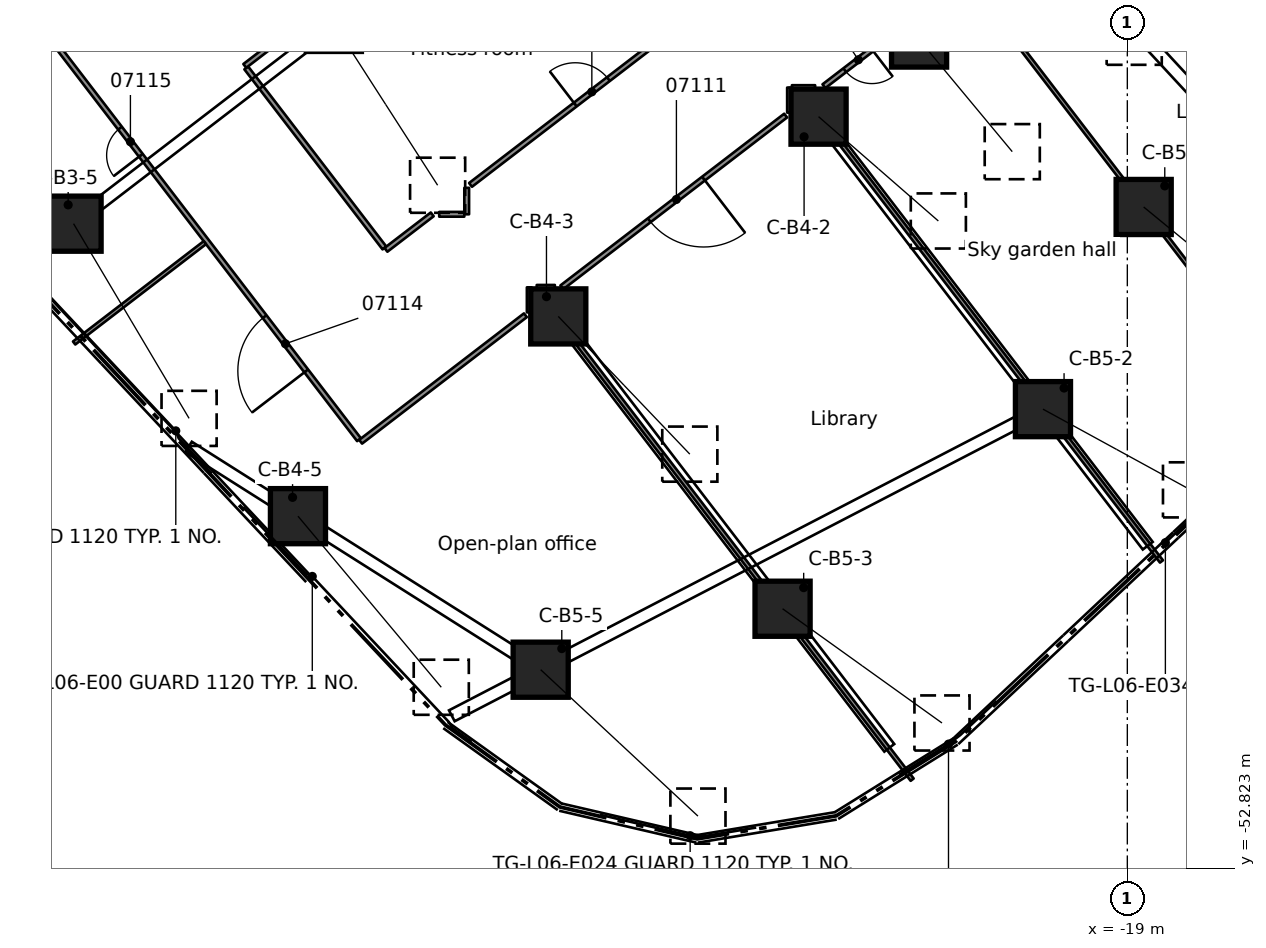
"""IFC4 building model, lengths in metres.
Left out: names, types, materials, properties, quantities, classifications, styles, units other than length and angle.
Written with IfcOpenShell. Run it as: python <this file> out.ifc"""

import sys

from ifc_helpers import new_model, si_unit, direction, frame, frame_2d, origin, origin_2d, place, context, subcontext, project, spatial, rectangle, extrude, element, fill, save


model = new_model("IFC4")
c1 = context("Model", 3, precision=1e-05, world=origin(), true_north=direction((0.0, 1.0)))
c2 = subcontext(c1, "Body", "Model", "MODEL_VIEW")
j1 = project(units=[si_unit("LENGTHUNIT", "METRE"), si_unit("PLANEANGLEUNIT", "RADIAN")], contexts=[c1])
p1 = place(None, origin())
s1 = spatial("IfcSite", under=j1, at=p1, CompositionType="ELEMENT")
p2 = place(p1, origin())
s2 = spatial("IfcBuilding", under=s1, at=p2, CompositionType="ELEMENT")
p3 = place(p2, frame((0.0, 0.0, 33.3)))
s3 = spatial("IfcBuildingStorey", under=s2, at=p3, CompositionType="ELEMENT", Elevation=33.3)
p4 = place(p3, frame((-39.879, -30.6, 0.638), z_axis=(0.476003991751, -0.740143212715, 0.474982341259), x_axis=(0.841076298964, 0.540916499397, 0.0)))
e1 = element("IfcColumn", 1, at=p4, inside=s3, PredefinedType="COLUMN", context=c2, shape_type="SweptSolid", body=[
    extrude(rectangle(XDim=1.45, YDim=1.45, at=origin_2d()), origin(), (0.0, 0.0, 1.0), 5.735),
])
p5 = place(p3, frame((-46.729, -35.856, 0.661), z_axis=(0.465465031922, -0.78439754496, 0.409954626171), x_axis=(0.859985150882, 0.510319057319, 0.0)))
e2 = element("IfcColumn", 2, at=p5, inside=s3, PredefinedType="COLUMN", context=c2, shape_type="SweptSolid", body=[
    extrude(rectangle(XDim=1.45, YDim=1.45, at=origin_2d()), origin(), (0.0, 0.0, 1.0), 6.531),
])
p6 = place(p3, frame((-27.125, -33.04, 0.603), z_axis=(0.626915434331, -0.545922874152, 0.555828439066), x_axis=(0.656712169931, 0.754141316906, 0.0)))
e3 = element("IfcColumn", 3, at=p6, inside=s3, PredefinedType="COLUMN", context=c2, shape_type="SweptSolid", body=[
    extrude(rectangle(XDim=1.45, YDim=1.45, at=origin_2d()), origin(), (0.0, 0.0, 1.0), 5.028),
])
p7 = place(p3, frame((-33.974, -38.296, 0.637), z_axis=(0.606713355896, -0.635258027433, 0.477855775689), x_axis=(0.723167492828, 0.690672699125, 0.0)))
e4 = element("IfcColumn", 4, at=p7, inside=s3, PredefinedType="COLUMN", context=c2, shape_type="SweptSolid", body=[
    extrude(rectangle(XDim=1.45, YDim=1.45, at=origin_2d()), origin(), (0.0, 0.0, 1.0), 5.705),
])
p8 = place(p3, frame((-40.824, -43.552, 0.659), z_axis=(0.584139953455, -0.697367651282, 0.415281679975), x_axis=(0.766596805008, 0.642128755431, 0.0)))
e5 = element("IfcColumn", 5, at=p8, inside=s3, PredefinedType="COLUMN", context=c2, shape_type="SweptSolid", body=[
    extrude(rectangle(XDim=1.45, YDim=1.45, at=origin_2d()), origin(), (0.0, 0.0, 1.0), 6.456),
])
p9 = place(p3, frame((-24.48, -31.011, 0.583), z_axis=(0.514125147633, -0.618557618127, 0.594190041678), x_axis=(0.769039707257, 0.639201008026, 0.0)))
e6 = element("IfcColumn", 6, at=p9, inside=s3, PredefinedType="COLUMN", context=c2, shape_type="SweptSolid", body=[
    extrude(rectangle(XDim=1.45, YDim=1.45, at=origin_2d()), origin(), (0.0, 0.0, 1.0), 4.769),
])
p10 = place(p3, frame((-20.99, -28.333, 0.552), z_axis=(0.48599783766, -0.586072291187, 0.648325050644), x_axis=(0.769766563569, 0.638325495035, 0.0)))
e7 = element("IfcColumn", 7, at=p10, inside=s3, PredefinedType="COLUMN", context=c2, shape_type="SweptSolid", body=[
    extrude(rectangle(XDim=1.45, YDim=1.45, at=origin_2d()), origin(), (0.0, 0.0, 1.0), 4.467),
])
p11 = place(p3, frame((-21.22, -40.736, 0.615), z_axis=(0.743612862638, -0.406754599494, 0.530651115432), x_axis=(0.479895272144, 0.877325782007, 0.0)))
e8 = element("IfcColumn", 8, at=p11, inside=s3, PredefinedType="COLUMN", context=c2, shape_type="SweptSolid", body=[
    extrude(rectangle(XDim=1.45, YDim=1.45, at=origin_2d()), origin(), (0.0, 0.0, 1.0), 5.222),
])
p12 = place(p3, frame((-28.072, -45.988, 0.641), z_axis=(0.719277998117, -0.515378613328, 0.465858397314), x_axis=(0.582441324018, 0.812872747775, 0.0)))
e9 = element("IfcColumn", 9, at=p12, inside=s3, PredefinedType="COLUMN", context=c2, shape_type="SweptSolid", body=[
    extrude(rectangle(XDim=1.45, YDim=1.45, at=origin_2d()), origin(), (0.0, 0.0, 1.0), 5.832),
])
p13 = place(p3, frame((-34.437, -47.592, 0.655), z_axis=(0.660892308039, -0.615231508422, 0.42978081416), x_axis=(0.681369867864, 0.731939275601, 0.0)))
e10 = element("IfcColumn", 10, at=p13, inside=s3, PredefinedType="COLUMN", context=c2, shape_type="SweptSolid", body=[
    extrude(rectangle(XDim=1.45, YDim=1.45, at=origin_2d()), origin(), (0.0, 0.0, 1.0), 6.261),
])
p14 = place(p3, frame((-18.57, -35.417, 0.574), z_axis=(0.612119529002, -0.502213041434, 0.610812363356), x_axis=(0.634287264239, 0.7730974495, 0.0)))
e11 = element("IfcColumn", 11, at=p14, inside=s3, PredefinedType="COLUMN", context=c2, shape_type="SweptSolid", body=[
    extrude(rectangle(XDim=1.45, YDim=1.45, at=origin_2d()), origin(), (0.0, 0.0, 1.0), 4.669),
])
p15 = place(p3, frame((-39.218, -41.54, 0.0), z_axis=(0.0, 0.0, 1.0), x_axis=(-0.608705901591, 0.79339594489, 0.0)))
e12 = element("IfcWall", 12, at=p15, inside=s3, PredefinedType="PARTITIONING", context=c2, shape_type="SweptSolid", body=[
    extrude(rectangle(XDim=13.169, YDim=0.125, at=frame_2d((6.584, 0.0))), origin(), (0.0, 0.0, 1.0), 3.56),
])
p16 = place(p15, frame((2.281, 0.0, 0.0)))
e13 = element("IfcOpeningElement", 13, at=p16, cuts=e12, PredefinedType="OPENING", context=c2, shape_type="SweptSolid", body=[
    extrude(rectangle(XDim=1.8, YDim=2.1, at=frame_2d((0.9, 1.05))), frame((0.0, 0.073, 0.0), z_axis=(0.0, -1.0, 0.0), x_axis=(1.0, 0.0, 0.0)), (0.0, 0.0, 1.0), 0.145),
])
p17 = place(p15, frame((9.431, 0.0, 0.0)))
e14 = element("IfcOpeningElement", 14, at=p17, cuts=e12, PredefinedType="OPENING", context=c2, shape_type="SweptSolid", body=[
    extrude(rectangle(XDim=0.9, YDim=2.1, at=frame_2d((0.45, 1.05))), frame((0.0, 0.073, 0.0), z_axis=(0.0, -1.0, 0.0), x_axis=(1.0, 0.0, 0.0)), (0.0, 0.0, 1.0), 0.145),
])
p18 = place(p3, frame((-42.185, -31.757, 0.0), z_axis=(0.0, 0.0, 1.0), x_axis=(0.608799639809, -0.793324018651, 0.0)))
e15 = element("IfcWall", 15, at=p18, inside=s3, PredefinedType="PARTITIONING", context=c2, shape_type="SweptSolid", body=[
    extrude(rectangle(XDim=5.972, YDim=0.125, at=frame_2d((2.986, 0.0))), origin(), (0.0, 0.0, 1.0), 3.56),
])
p19 = place(p3, frame((-34.501, -37.664, 0.0), z_axis=(0.0, 0.0, 1.0), x_axis=(0.608768597096, -0.793347839973, 0.0)))
e16 = element("IfcWall", 16, at=p19, inside=s3, PredefinedType="PARTITIONING", context=c2, shape_type="SweptSolid", body=[
    extrude(rectangle(XDim=16.162, YDim=0.1, at=frame_2d((8.081, 0.0))), origin(), (0.0, 0.0, 1.0), 3.56),
])
p20 = place(p3, frame((-27.599, -32.368, 0.0), z_axis=(0.0, 0.0, 1.0), x_axis=(0.608787633684, -0.793333232049, 0.0)))
e17 = element("IfcWall", 17, at=p20, inside=s3, PredefinedType="PARTITIONING", context=c2, shape_type="SweptSolid", body=[
    extrude(rectangle(XDim=15.6, YDim=0.1, at=frame_2d((7.8, 0.0))), origin(), (0.0, 0.0, 1.0), 3.56),
])
p21 = place(p3, frame((-23.19, -29.408, 0.0), z_axis=(0.0, 0.0, 1.0), x_axis=(0.608771263508, -0.793345793917, 0.0)))
e18 = element("IfcWall", 18, at=p21, inside=s3, PredefinedType="PARTITIONING", context=c2, shape_type="SweptSolid", body=[
    extrude(rectangle(XDim=14.738, YDim=0.1, at=frame_2d((7.369, 0.0))), origin(), (0.0, 0.0, 1.0), 3.56),
])
p22 = place(p3, frame((-18.742, -25.995, 0.0), z_axis=(0.0, 0.0, 1.0), x_axis=(0.608756044644, -0.79335747183, 0.0)))
e19 = element("IfcWall", 19, at=p22, inside=s3, PredefinedType="PARTITIONING", context=c2, shape_type="SweptSolid", body=[
    extrude(rectangle(XDim=14.181, YDim=0.1, at=frame_2d((7.091, 0.0))), origin(), (0.0, 0.0, 1.0), 3.56),
])
p23 = place(p3, frame((-34.541, -37.531, 0.0), z_axis=(0.0, 0.0, 1.0), x_axis=(1.0, 0.0, 0.0)))
e20 = element("IfcWall", 20, at=p23, inside=s3, PredefinedType="PARTITIONING", context=c2, shape_type="SweptSolid", body=[
    extrude(rectangle(XDim=0.477, YDim=0.125, at=frame_2d((0.239, 0.0))), origin(), (0.0, 0.0, 1.0), 3.56),
])
p24 = place(p3, frame((-37.107, -35.609, 0.0), z_axis=(0.0, 0.0, 1.0), x_axis=(1.0, 0.0, 0.0)))
e21 = element("IfcWall", 21, at=p24, inside=s3, PredefinedType="PARTITIONING", context=c2, shape_type="SweptSolid", body=[
    extrude(rectangle(XDim=0.66, YDim=0.125, at=frame_2d((0.33, 0.0))), origin(), (0.0, 0.0, 1.0), 3.56),
])
p25 = place(p3, frame((-27.826, -32.275, 0.0), z_axis=(0.0, 0.0, 1.0), x_axis=(1.0, 0.0, 0.0)))
e22 = element("IfcWall", 22, at=p25, inside=s3, PredefinedType="PARTITIONING", context=c2, shape_type="SweptSolid", body=[
    extrude(rectangle(XDim=0.611, YDim=0.125, at=frame_2d((0.305, 0.0))), origin(), (0.0, 0.0, 1.0), 3.56),
])
p26 = place(p3, frame((-39.175, -41.594, 0.0), z_axis=(0.0, 0.0, 1.0), x_axis=(0.793282735045, 0.608853432511, 0.0)))
e23 = element("IfcWall", 23, at=p26, inside=s3, PredefinedType="PARTITIONING", context=c2, shape_type="SweptSolid", body=[
    extrude(rectangle(XDim=5.466, YDim=0.125, at=frame_2d((2.733, 0.0))), origin(), (0.0, 0.0, 1.0), 3.56),
])
p27 = place(p3, frame((-27.991, -33.012, 0.0), z_axis=(0.0, 0.0, 1.0), x_axis=(-0.793332599064, -0.608788458549, 0.0)))
e24 = element("IfcWall", 24, at=p27, inside=s3, PredefinedType="PARTITIONING", context=c2, shape_type="SweptSolid", body=[
    extrude(rectangle(XDim=7.423, YDim=0.125, at=frame_2d((3.711, 0.0))), origin(), (0.0, 0.0, 1.0), 3.56),
])
p28 = place(p27, frame((2.723, 0.0, 0.0)))
e25 = element("IfcOpeningElement", 25, at=p28, cuts=e24, PredefinedType="OPENING", context=c2, shape_type="SweptSolid", body=[
    extrude(rectangle(XDim=1.8, YDim=2.1, at=frame_2d((0.9, 1.05))), frame((0.0, 0.073, 0.0), z_axis=(0.0, -1.0, 0.0), x_axis=(1.0, 0.0, 0.0)), (0.0, 0.0, 1.0), 0.145),
])
p29 = place(p3, frame((-25.346, -30.982, 0.0), z_axis=(0.0, 0.0, 1.0), x_axis=(-0.79329604463, -0.608836090893, 0.0)))
e26 = element("IfcWall", 26, at=p29, inside=s3, PredefinedType="PARTITIONING", context=c2, shape_type="SweptSolid", body=[
    extrude(rectangle(XDim=2.065, YDim=0.125, at=frame_2d((1.032, 0.0))), origin(), (0.0, 0.0, 1.0), 3.56),
])
p30 = place(p29, frame((0.473, 0.0, 0.0)))
e27 = element("IfcOpeningElement", 27, at=p30, cuts=e26, PredefinedType="OPENING", context=c2, shape_type="SweptSolid", body=[
    extrude(rectangle(XDim=0.9, YDim=2.1, at=frame_2d((0.45, 1.05))), frame((0.0, 0.073, 0.0), z_axis=(0.0, -1.0, 0.0), x_axis=(1.0, 0.0, 0.0)), (0.0, 0.0, 1.0), 0.145),
])
p31 = place(p3, frame((-38.509, -36.545, 0.0), z_axis=(0.0, 0.0, 1.0), x_axis=(0.793598680467, 0.608441561994, 0.0)))
e28 = element("IfcWall", 28, at=p31, inside=s3, PredefinedType="PARTITIONING", context=c2, shape_type="SweptSolid", body=[
    extrude(rectangle(XDim=1.535, YDim=0.125, at=frame_2d((0.768, 0.0))), origin(), (0.0, 0.0, 1.0), 3.56),
])
p32 = place(p3, frame((-36.283, -34.836, 0.0), z_axis=(0.0, 0.0, 1.0), x_axis=(0.793406369961, 0.608692313165, 0.0)))
e29 = element("IfcWall", 29, at=p32, inside=s3, PredefinedType="PARTITIONING", context=c2, shape_type="SweptSolid", body=[
    extrude(rectangle(XDim=8.392, YDim=0.125, at=frame_2d((4.196, 0.0))), origin(), (0.0, 0.0, 1.0), 3.56),
])
p33 = place(p32, frame((3.473, 0.0, 0.0)))
e30 = element("IfcOpeningElement", 30, at=p33, cuts=e29, PredefinedType="OPENING", context=c2, shape_type="SweptSolid", body=[
    extrude(rectangle(XDim=1.1, YDim=2.1, at=frame_2d((0.55, 1.05))), frame((0.0, 0.073, 0.0), z_axis=(0.0, -1.0, 0.0), x_axis=(1.0, 0.0, 0.0)), (0.0, 0.0, 1.0), 0.145),
])
p34 = place(p3, frame((-46.714, -38.996, 0.0), z_axis=(0.0, 0.0, 1.0), x_axis=(0.793309958448, 0.608817961157, 0.0)))
e31 = element("IfcWall", 31, at=p34, inside=s3, PredefinedType="PARTITIONING", context=c2, shape_type="SweptSolid", body=[
    extrude(rectangle(XDim=4.336, YDim=0.1, at=frame_2d((2.168, 0.0))), origin(), (0.0, 0.0, 1.0), 3.56),
])
p35 = place(p3, frame((-42.223, -31.705, 0.0), z_axis=(0.0, 0.0, 1.0), x_axis=(0.793135510501, 0.609045205204, 0.0)))
e32 = element("IfcWall", 32, at=p35, inside=s3, PredefinedType="PARTITIONING", context=c2, shape_type="SweptSolid", body=[
    extrude(rectangle(XDim=1.862, YDim=0.125, at=frame_2d((0.931, 0.0))), origin(), (0.0, 0.0, 1.0), 3.56),
])
p36 = place(p3, frame((-27.889, -32.934, 0.0), z_axis=(0.0, 0.0, 1.0), x_axis=(0.0, 1.0, 0.0)))
e33 = element("IfcWall", 33, at=p36, inside=s3, PredefinedType="PARTITIONING", context=c2, shape_type="SweptSolid", body=[
    extrude(rectangle(XDim=0.659, YDim=0.125, at=frame_2d((0.33, 0.0))), origin(), (0.0, 0.0, 1.0), 3.56),
])
p37 = place(p3, frame((-34.738, -38.19, 0.0), z_axis=(0.0, 0.0, 1.0), x_axis=(0.0, 1.0, 0.0)))
e34 = element("IfcWall", 34, at=p37, inside=s3, PredefinedType="PARTITIONING", context=c2, shape_type="SweptSolid", body=[
    extrude(rectangle(XDim=0.659, YDim=0.125, at=frame_2d((0.33, 0.0))), origin(), (0.0, 0.0, 1.0), 3.56),
])
p38 = place(p3, frame((-36.384, -35.609, 0.0), z_axis=(0.0, 0.0, 1.0), x_axis=(0.0, 1.0, 0.0)))
e35 = element("IfcWall", 35, at=p38, inside=s3, PredefinedType="PARTITIONING", context=c2, shape_type="SweptSolid", body=[
    extrude(rectangle(XDim=0.696, YDim=0.125, at=frame_2d((0.348, 0.0))), origin(), (0.0, 0.0, 1.0), 3.56),
])
p39 = place(p30, origin())
e36 = element("IfcDoor", 36, at=p39, inside=s3, OperationType="SINGLE_SWING_LEFT", PredefinedType="DOOR", context=c2, shape_type="SweptSolid", body=[
    extrude(rectangle(XDim=0.9, YDim=2.1, at=frame_2d((0.45, 1.05))), frame((0.0, 0.025, 0.0), z_axis=(0.0, -1.0, 0.0), x_axis=(1.0, 0.0, 0.0)), (0.0, 0.0, 1.0), 0.05),
])
fill(e27, e36)
p40 = place(p28, origin())
e37 = element("IfcDoor", 37, at=p40, inside=s3, OperationType="DOUBLE_DOOR_SINGLE_SWING", PredefinedType="DOOR", context=c2, shape_type="SweptSolid", body=[
    extrude(rectangle(XDim=1.8, YDim=2.1, at=frame_2d((0.9, 1.05))), frame((0.0, 0.025, 0.0), z_axis=(0.0, -1.0, 0.0), x_axis=(1.0, 0.0, 0.0)), (0.0, 0.0, 1.0), 0.05),
])
fill(e25, e37)
p41 = place(p33, origin())
e38 = element("IfcDoor", 38, at=p41, inside=s3, OperationType="SINGLE_SWING_LEFT", PredefinedType="DOOR", context=c2, shape_type="SweptSolid", body=[
    extrude(rectangle(XDim=1.1, YDim=2.1, at=frame_2d((0.55, 1.05))), frame((0.0, 0.025, 0.0), z_axis=(0.0, -1.0, 0.0), x_axis=(1.0, 0.0, 0.0)), (0.0, 0.0, 1.0), 0.05),
])
fill(e30, e38)
p42 = place(p16, origin())
e39 = element("IfcDoor", 39, at=p42, inside=s3, OperationType="DOUBLE_DOOR_SINGLE_SWING", PredefinedType="DOOR", context=c2, shape_type="SweptSolid", body=[
    extrude(rectangle(XDim=1.8, YDim=2.1, at=frame_2d((0.9, 1.05))), frame((0.0, 0.025, 0.0), z_axis=(0.0, -1.0, 0.0), x_axis=(1.0, 0.0, 0.0)), (0.0, 0.0, 1.0), 0.05),
])
fill(e13, e39)
p43 = place(p17, origin())
e40 = element("IfcDoor", 40, at=p43, inside=s3, OperationType="SINGLE_SWING_RIGHT", PredefinedType="DOOR", context=c2, shape_type="SweptSolid", body=[
    extrude(rectangle(XDim=0.9, YDim=2.1, at=frame_2d((0.45, 1.05))), frame((0.0, 0.025, 0.0), z_axis=(0.0, -1.0, 0.0), x_axis=(1.0, 0.0, 0.0)), (0.0, 0.0, 1.0), 0.05),
])
fill(e14, e40)
save(model, sys.argv[1])
